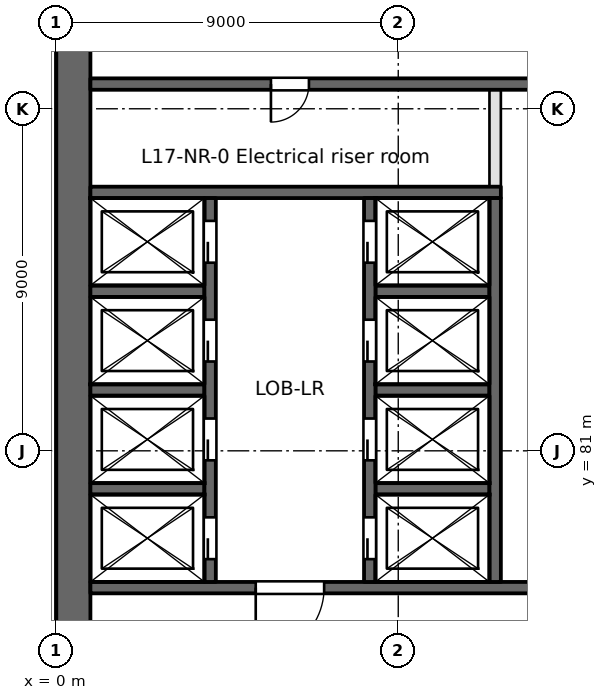
"""IFC4 building model, lengths in metres.
Left out: names, types, materials, properties, quantities, classifications, styles, units other than length and angle.
Written with IfcOpenShell. Run it as: python <this file> out.ifc"""

import sys

from ifc_helpers import new_model, si_unit, direction, frame, frame_2d, origin, place, context, subcontext, project, spatial, rectangle, extrude, element, fill, save


model = new_model("IFC4")
c1 = context("Model", 3, precision=1e-05, world=origin(), true_north=direction((0.0, 1.0)))
c2 = subcontext(c1, "Body", "Model", "MODEL_VIEW")
j1 = project(units=[si_unit("LENGTHUNIT", "METRE"), si_unit("PLANEANGLEUNIT", "RADIAN")], contexts=[c1])
p1 = place(None, origin())
s1 = spatial("IfcSite", under=j1, at=p1, CompositionType="ELEMENT")
p2 = place(p1, origin())
s2 = spatial("IfcBuilding", under=s1, at=p2, CompositionType="ELEMENT")
p3 = place(p2, frame((0.0, 0.0, 72.8)))
s3 = spatial("IfcBuildingStorey", under=s2, at=p3, CompositionType="ELEMENT", Elevation=72.8)
p4 = place(p3, frame((0.45, 94.5, 0.0), z_axis=(0.0, 0.0, 1.0), x_axis=(0.0, -1.0, 0.0)))
e1 = element("IfcWall", 1, at=p4, inside=s3, PredefinedType="SHEAR", context=c2, shape_type="SweptSolid", body=[
    extrude(rectangle(XDim=66.187, YDim=0.9, at=frame_2d((33.094, 0.0))), origin(), (0.0, 0.0, 1.0), 3.7),
])
p5 = place(p3, frame((0.9, 77.4, -0.4), z_axis=(0.0, 0.0, 1.0), x_axis=(1.0, 0.0, 0.0)))
e2 = element("IfcWall", 2, at=p5, inside=s3, PredefinedType="SOLIDWALL", context=c2, shape_type="SweptSolid", body=[
    extrude(rectangle(XDim=28.95, YDim=0.3, at=frame_2d((14.475, 0.0))), origin(), (0.0, 0.0, 1.0), 3.7),
])
p6 = place(p5, frame((4.35, 0.0, 0.4)))
e3 = element("IfcOpeningElement", 3, at=p6, cuts=e2, PredefinedType="OPENING", context=c2, shape_type="SweptSolid", body=[
    extrude(rectangle(XDim=1.8, YDim=2.1, at=frame_2d((0.9, 1.05))), frame((0.0, 0.15, 0.0), z_axis=(0.0, -1.0, 0.0), x_axis=(1.0, 0.0, 0.0)), (0.0, 0.0, 1.0), 0.3),
])
p7 = place(p5, frame((25.95, 0.0, 0.4)))
e4 = element("IfcOpeningElement", 4, at=p7, cuts=e2, PredefinedType="OPENING", context=c2, shape_type="SweptSolid", body=[
    extrude(rectangle(XDim=1.8, YDim=2.1, at=frame_2d((0.9, 1.05))), frame((0.0, 0.15, 0.0), z_axis=(0.0, -1.0, 0.0), x_axis=(1.0, 0.0, 0.0)), (0.0, 0.0, 1.0), 0.3),
])
p8 = place(p5, frame((11.95, 0.0, 0.4)))
e5 = element("IfcOpeningElement", 5, at=p8, cuts=e2, PredefinedType="OPENING", context=c2, shape_type="SweptSolid", body=[
    extrude(rectangle(XDim=1.0, YDim=2.1, at=frame_2d((0.5, 1.05))), frame((0.0, 0.15, 0.0), z_axis=(0.0, -1.0, 0.0), x_axis=(1.0, 0.0, 0.0)), (0.0, 0.0, 1.0), 0.3),
])
p9 = place(p5, frame((19.15, 0.0, 0.4)))
e6 = element("IfcOpeningElement", 6, at=p9, cuts=e2, PredefinedType="OPENING", context=c2, shape_type="SweptSolid", body=[
    extrude(rectangle(XDim=1.0, YDim=2.1, at=frame_2d((0.5, 1.05))), frame((0.0, 0.15, 0.0), z_axis=(0.0, -1.0, 0.0), x_axis=(1.0, 0.0, 0.0)), (0.0, 0.0, 1.0), 0.3),
])
for number, where, z_axis, x_axis in (
    (7, (0.9, 80.0, -0.4), (0.0, 0.0, 1.0), (1.0, 0.0, 0.0)),
    (8, (8.4, 80.0, -0.4), (0.0, 0.0, 1.0), (1.0, 0.0, 0.0)),
    (9, (0.9, 82.6, -0.4), (0.0, 0.0, 1.0), (1.0, 0.0, 0.0)),
    (10, (8.4, 82.6, -0.4), (0.0, 0.0, 1.0), (1.0, 0.0, 0.0)),
    (11, (0.9, 85.2, -0.4), (0.0, 0.0, 1.0), (1.0, 0.0, 0.0)),
    (12, (8.4, 85.2, -0.4), (0.0, 0.0, 1.0), (1.0, 0.0, 0.0)),
):
    element("IfcWall", number, at=place(p3, frame(where, z_axis=z_axis, x_axis=x_axis)), inside=s3, PredefinedType="SOLIDWALL", context=c2, shape_type="SweptSolid", body=[
        extrude(rectangle(XDim=3.0, YDim=0.3, at=frame_2d((1.5, 0.0))), origin(), (0.0, 0.0, 1.0), 3.7),
    ])
p10 = place(p3, frame((0.9, 87.8, -0.4), z_axis=(0.0, 0.0, 1.0), x_axis=(1.0, 0.0, 0.0)))
e13 = element("IfcWall", 13, at=p10, inside=s3, PredefinedType="SOLIDWALL", context=c2, shape_type="SweptSolid", body=[
    extrude(rectangle(XDim=10.8, YDim=0.3, at=frame_2d((5.4, 0.0))), origin(), (0.0, 0.0, 1.0), 3.7),
])
p11 = place(p3, frame((0.9, 90.65, -0.4), z_axis=(0.0, 0.0, 1.0), x_axis=(1.0, 0.0, 0.0)))
e14 = element("IfcWall", 14, at=p11, inside=s3, PredefinedType="SOLIDWALL", context=c2, shape_type="SweptSolid", body=[
    extrude(rectangle(XDim=34.6, YDim=0.3, at=frame_2d((17.3, 0.0))), origin(), (0.0, 0.0, 1.0), 3.7),
])
p12 = place(p11, frame((4.75, 0.0, 0.4)))
e15 = element("IfcOpeningElement", 15, at=p12, cuts=e14, PredefinedType="OPENING", context=c2, shape_type="SweptSolid", body=[
    extrude(rectangle(XDim=1.0, YDim=2.1, at=frame_2d((0.5, 1.05))), frame((0.0, 0.15, 0.0), z_axis=(0.0, -1.0, 0.0), x_axis=(1.0, 0.0, 0.0)), (0.0, 0.0, 1.0), 0.3),
])
p13 = place(p11, frame((24.7, 0.0, 0.4)))
e16 = element("IfcOpeningElement", 16, at=p13, cuts=e14, PredefinedType="OPENING", context=c2, shape_type="SweptSolid", body=[
    extrude(rectangle(XDim=1.0, YDim=2.1, at=frame_2d((0.5, 1.05))), frame((0.0, 0.15, 0.0), z_axis=(0.0, -1.0, 0.0), x_axis=(1.0, 0.0, 0.0)), (0.0, 0.0, 1.0), 0.3),
])
p14 = place(p11, frame((15.55, 0.0, 0.4)))
e17 = element("IfcOpeningElement", 17, at=p14, cuts=e14, PredefinedType="OPENING", context=c2, shape_type="SweptSolid", body=[
    extrude(rectangle(XDim=1.0, YDim=2.1, at=frame_2d((0.5, 1.05))), frame((0.0, 0.15, 0.0), z_axis=(0.0, -1.0, 0.0), x_axis=(1.0, 0.0, 0.0)), (0.0, 0.0, 1.0), 0.3),
])
p15 = place(p11, frame((31.4, 0.0, 0.4)))
e18 = element("IfcOpeningElement", 18, at=p15, cuts=e14, PredefinedType="OPENING", context=c2, shape_type="SweptSolid", body=[
    extrude(rectangle(XDim=1.0, YDim=2.1, at=frame_2d((0.5, 1.05))), frame((0.0, 0.15, 0.0), z_axis=(0.0, -1.0, 0.0), x_axis=(1.0, 0.0, 0.0)), (0.0, 0.0, 1.0), 0.3),
])
p16 = place(p3, frame((4.05, 77.55, -0.4), z_axis=(0.0, 0.0, 1.0), x_axis=(0.0, 1.0, 0.0)))
e19 = element("IfcWall", 19, at=p16, inside=s3, PredefinedType="SOLIDWALL", context=c2, shape_type="SweptSolid", body=[
    extrude(rectangle(XDim=10.1, YDim=0.3, at=frame_2d((5.05, 0.0))), origin(), (0.0, 0.0, 1.0), 3.7),
])
p17 = place(p16, frame((0.6, 0.0, 0.4)))
e20 = element("IfcOpeningElement", 20, at=p17, cuts=e19, PredefinedType="OPENING", context=c2, shape_type="SweptSolid", body=[
    extrude(rectangle(XDim=1.1, YDim=2.1, at=frame_2d((0.55, 1.05))), frame((0.0, 0.15, 0.0), z_axis=(0.0, -1.0, 0.0), x_axis=(1.0, 0.0, 0.0)), (0.0, 0.0, 1.0), 0.3),
])
p18 = place(p16, frame((3.2, 0.0, 0.4)))
e21 = element("IfcOpeningElement", 21, at=p18, cuts=e19, PredefinedType="OPENING", context=c2, shape_type="SweptSolid", body=[
    extrude(rectangle(XDim=1.1, YDim=2.1, at=frame_2d((0.55, 1.05))), frame((0.0, 0.15, 0.0), z_axis=(0.0, -1.0, 0.0), x_axis=(1.0, 0.0, 0.0)), (0.0, 0.0, 1.0), 0.3),
])
p19 = place(p16, frame((5.8, 0.0, 0.4)))
e22 = element("IfcOpeningElement", 22, at=p19, cuts=e19, PredefinedType="OPENING", context=c2, shape_type="SweptSolid", body=[
    extrude(rectangle(XDim=1.1, YDim=2.1, at=frame_2d((0.55, 1.05))), frame((0.0, 0.15, 0.0), z_axis=(0.0, -1.0, 0.0), x_axis=(1.0, 0.0, 0.0)), (0.0, 0.0, 1.0), 0.3),
])
p20 = place(p16, frame((8.4, 0.0, 0.4)))
e23 = element("IfcOpeningElement", 23, at=p20, cuts=e19, PredefinedType="OPENING", context=c2, shape_type="SweptSolid", body=[
    extrude(rectangle(XDim=1.1, YDim=2.1, at=frame_2d((0.55, 1.05))), frame((0.0, 0.15, 0.0), z_axis=(0.0, -1.0, 0.0), x_axis=(1.0, 0.0, 0.0)), (0.0, 0.0, 1.0), 0.3),
])
p21 = place(p3, frame((8.25, 77.55, -0.4), z_axis=(0.0, 0.0, 1.0), x_axis=(0.0, 1.0, 0.0)))
e24 = element("IfcWall", 24, at=p21, inside=s3, PredefinedType="SOLIDWALL", context=c2, shape_type="SweptSolid", body=[
    extrude(rectangle(XDim=10.1, YDim=0.3, at=frame_2d((5.05, 0.0))), origin(), (0.0, 0.0, 1.0), 3.7),
])
p22 = place(p21, frame((0.6, 0.0, 0.4)))
e25 = element("IfcOpeningElement", 25, at=p22, cuts=e24, PredefinedType="OPENING", context=c2, shape_type="SweptSolid", body=[
    extrude(rectangle(XDim=1.1, YDim=2.1, at=frame_2d((0.55, 1.05))), frame((0.0, 0.15, 0.0), z_axis=(0.0, -1.0, 0.0), x_axis=(1.0, 0.0, 0.0)), (0.0, 0.0, 1.0), 0.3),
])
p23 = place(p21, frame((3.2, 0.0, 0.4)))
e26 = element("IfcOpeningElement", 26, at=p23, cuts=e24, PredefinedType="OPENING", context=c2, shape_type="SweptSolid", body=[
    extrude(rectangle(XDim=1.1, YDim=2.1, at=frame_2d((0.55, 1.05))), frame((0.0, 0.15, 0.0), z_axis=(0.0, -1.0, 0.0), x_axis=(1.0, 0.0, 0.0)), (0.0, 0.0, 1.0), 0.3),
])
p24 = place(p21, frame((5.8, 0.0, 0.4)))
e27 = element("IfcOpeningElement", 27, at=p24, cuts=e24, PredefinedType="OPENING", context=c2, shape_type="SweptSolid", body=[
    extrude(rectangle(XDim=1.1, YDim=2.1, at=frame_2d((0.55, 1.05))), frame((0.0, 0.15, 0.0), z_axis=(0.0, -1.0, 0.0), x_axis=(1.0, 0.0, 0.0)), (0.0, 0.0, 1.0), 0.3),
])
p25 = place(p21, frame((8.4, 0.0, 0.4)))
e28 = element("IfcOpeningElement", 28, at=p25, cuts=e24, PredefinedType="OPENING", context=c2, shape_type="SweptSolid", body=[
    extrude(rectangle(XDim=1.1, YDim=2.1, at=frame_2d((0.55, 1.05))), frame((0.0, 0.15, 0.0), z_axis=(0.0, -1.0, 0.0), x_axis=(1.0, 0.0, 0.0)), (0.0, 0.0, 1.0), 0.3),
])
p26 = place(p3, frame((11.55, 77.55, -0.4), z_axis=(0.0, 0.0, 1.0), x_axis=(0.0, 1.0, 0.0)))
e29 = element("IfcWall", 29, at=p26, inside=s3, PredefinedType="SOLIDWALL", context=c2, shape_type="SweptSolid", body=[
    extrude(rectangle(XDim=10.1, YDim=0.3, at=frame_2d((5.05, 0.0))), origin(), (0.0, 0.0, 1.0), 3.7),
])
p27 = place(p3, frame((11.55, 87.95, 0.0), z_axis=(0.0, 0.0, 1.0), x_axis=(0.0, 1.0, 0.0)))
e30 = element("IfcWall", 30, at=p27, inside=s3, PredefinedType="PARTITIONING", context=c2, shape_type="SweptSolid", body=[
    extrude(rectangle(XDim=2.55, YDim=0.3, at=frame_2d((1.275, 0.0))), origin(), (0.0, 0.0, 1.0), 3.3),
])
p28 = place(p17, origin())
e31 = element("IfcDoor", 31, at=p28, inside=s3, OperationType="SLIDING_TO_RIGHT", PredefinedType="DOOR", context=c2, shape_type="SweptSolid", body=[
    extrude(rectangle(XDim=1.1, YDim=2.1, at=frame_2d((0.55, 1.05))), frame((0.0, 0.025, 0.0), z_axis=(0.0, -1.0, 0.0), x_axis=(1.0, 0.0, 0.0)), (0.0, 0.0, 1.0), 0.05),
])
fill(e20, e31)
p29 = place(p18, origin())
e32 = element("IfcDoor", 32, at=p29, inside=s3, OperationType="SLIDING_TO_LEFT", PredefinedType="DOOR", context=c2, shape_type="SweptSolid", body=[
    extrude(rectangle(XDim=1.1, YDim=2.1, at=frame_2d((0.55, 1.05))), frame((0.0, 0.025, 0.0), z_axis=(0.0, -1.0, 0.0), x_axis=(1.0, 0.0, 0.0)), (0.0, 0.0, 1.0), 0.05),
])
fill(e21, e32)
p30 = place(p19, origin())
e33 = element("IfcDoor", 33, at=p30, inside=s3, OperationType="SLIDING_TO_RIGHT", PredefinedType="DOOR", context=c2, shape_type="SweptSolid", body=[
    extrude(rectangle(XDim=1.1, YDim=2.1, at=frame_2d((0.55, 1.05))), frame((0.0, 0.025, 0.0), z_axis=(0.0, -1.0, 0.0), x_axis=(1.0, 0.0, 0.0)), (0.0, 0.0, 1.0), 0.05),
])
fill(e22, e33)
p31 = place(p20, origin())
e34 = element("IfcDoor", 34, at=p31, inside=s3, OperationType="SLIDING_TO_LEFT", PredefinedType="DOOR", context=c2, shape_type="SweptSolid", body=[
    extrude(rectangle(XDim=1.1, YDim=2.1, at=frame_2d((0.55, 1.05))), frame((0.0, 0.025, 0.0), z_axis=(0.0, -1.0, 0.0), x_axis=(1.0, 0.0, 0.0)), (0.0, 0.0, 1.0), 0.05),
])
fill(e23, e34)
p32 = place(p22, origin())
e35 = element("IfcDoor", 35, at=p32, inside=s3, OperationType="SLIDING_TO_RIGHT", PredefinedType="DOOR", context=c2, shape_type="SweptSolid", body=[
    extrude(rectangle(XDim=1.1, YDim=2.1, at=frame_2d((0.55, 1.05))), frame((0.0, 0.025, 0.0), z_axis=(0.0, -1.0, 0.0), x_axis=(1.0, 0.0, 0.0)), (0.0, 0.0, 1.0), 0.05),
])
fill(e25, e35)
p33 = place(p23, origin())
e36 = element("IfcDoor", 36, at=p33, inside=s3, OperationType="SLIDING_TO_LEFT", PredefinedType="DOOR", context=c2, shape_type="SweptSolid", body=[
    extrude(rectangle(XDim=1.1, YDim=2.1, at=frame_2d((0.55, 1.05))), frame((0.0, 0.025, 0.0), z_axis=(0.0, -1.0, 0.0), x_axis=(1.0, 0.0, 0.0)), (0.0, 0.0, 1.0), 0.05),
])
fill(e26, e36)
p34 = place(p24, origin())
e37 = element("IfcDoor", 37, at=p34, inside=s3, OperationType="SLIDING_TO_RIGHT", PredefinedType="DOOR", context=c2, shape_type="SweptSolid", body=[
    extrude(rectangle(XDim=1.1, YDim=2.1, at=frame_2d((0.55, 1.05))), frame((0.0, 0.025, 0.0), z_axis=(0.0, -1.0, 0.0), x_axis=(1.0, 0.0, 0.0)), (0.0, 0.0, 1.0), 0.05),
])
fill(e27, e37)
p35 = place(p25, origin())
e38 = element("IfcDoor", 38, at=p35, inside=s3, OperationType="SLIDING_TO_LEFT", PredefinedType="DOOR", context=c2, shape_type="SweptSolid", body=[
    extrude(rectangle(XDim=1.1, YDim=2.1, at=frame_2d((0.55, 1.05))), frame((0.0, 0.025, 0.0), z_axis=(0.0, -1.0, 0.0), x_axis=(1.0, 0.0, 0.0)), (0.0, 0.0, 1.0), 0.05),
])
fill(e28, e38)
p36 = place(p6, frame((1.8, 0.0, 0.0), z_axis=(0.0, 0.0, 1.0), x_axis=(-1.0, 0.0, 0.0)))
e39 = element("IfcDoor", 39, at=p36, inside=s3, OperationType="SINGLE_SWING_RIGHT", PredefinedType="DOOR", context=c2, shape_type="SweptSolid", body=[
    extrude(rectangle(XDim=1.8, YDim=2.1, at=frame_2d((0.9, 1.05))), frame((0.0, 0.025, 0.0), z_axis=(0.0, -1.0, 0.0), x_axis=(1.0, 0.0, 0.0)), (0.0, 0.0, 1.0), 0.05),
])
fill(e3, e39)
p37 = place(p12, frame((1.0, 0.0, 0.0), z_axis=(0.0, 0.0, 1.0), x_axis=(-1.0, 0.0, 0.0)))
e40 = element("IfcDoor", 40, at=p37, inside=s3, OperationType="SINGLE_SWING_RIGHT", PredefinedType="DOOR", context=c2, shape_type="SweptSolid", body=[
    extrude(rectangle(XDim=1.0, YDim=2.1, at=frame_2d((0.5, 1.05))), frame((0.0, 0.025, 0.0), z_axis=(0.0, -1.0, 0.0), x_axis=(1.0, 0.0, 0.0)), (0.0, 0.0, 1.0), 0.05),
])
fill(e15, e40)
save(model, sys.argv[1])
